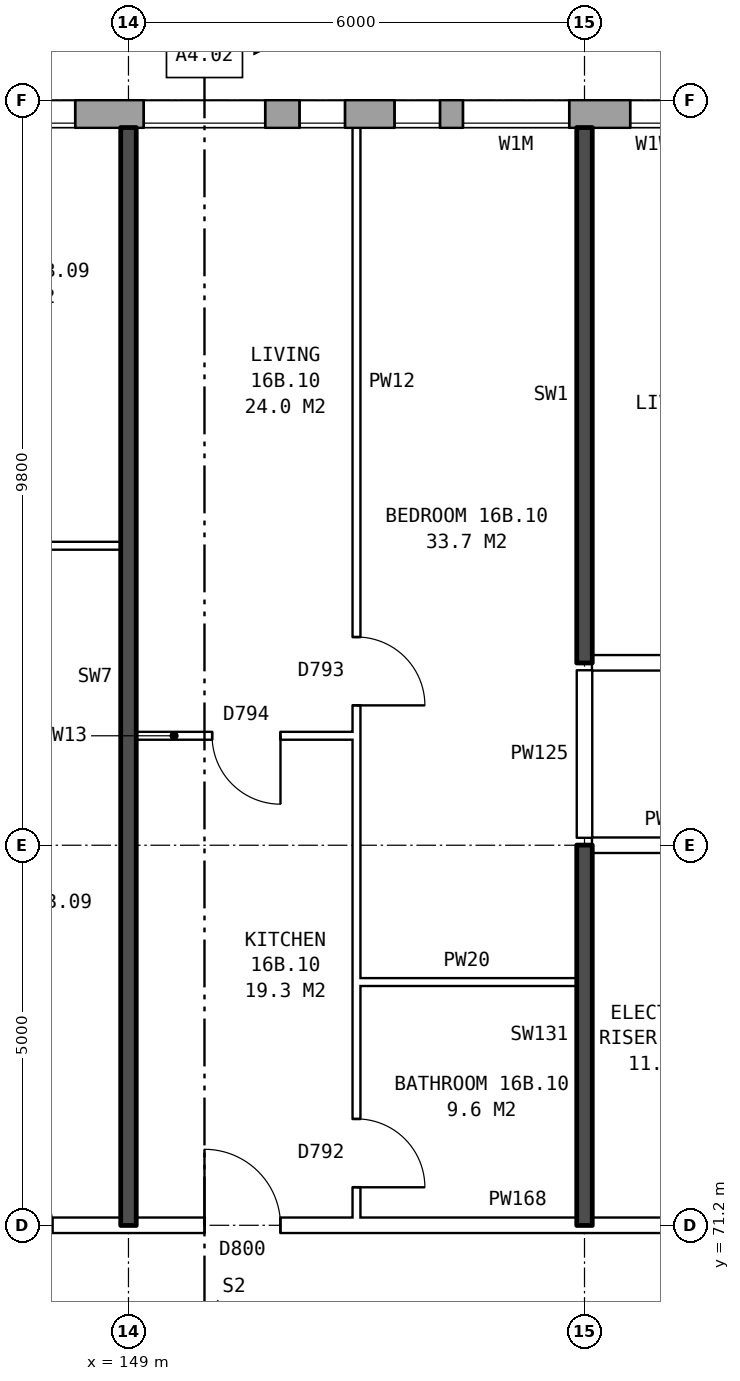
"""IFC4 building model, lengths in metres.
Left out: names, types, materials, properties, quantities, classifications, styles, units other than length and angle.
Written with IfcOpenShell. Run it as: python <this file> out.ifc"""

import sys

from ifc_helpers import new_model, si_unit, direction, frame, frame_2d, origin, place, context, subcontext, project, spatial, rectangle, extrude, element, fill, save


model = new_model("IFC4")
c1 = context("Model", 3, precision=1e-05, world=origin(), true_north=direction((0.0, 1.0)))
c2 = subcontext(c1, "Body", "Model", "MODEL_VIEW")
j1 = project(units=[si_unit("LENGTHUNIT", "METRE"), si_unit("PLANEANGLEUNIT", "RADIAN")], contexts=[c1])
p1 = place(None, origin())
s1 = spatial("IfcSite", under=j1, at=p1, CompositionType="ELEMENT")
p2 = place(p1, origin())
s2 = spatial("IfcBuilding", under=s1, at=p2, CompositionType="ELEMENT")
p3 = place(p2, frame((0.0, 0.0, 59.8)))
s3 = spatial("IfcBuildingStorey", under=s2, at=p3, CompositionType="ELEMENT", Elevation=59.8)
p4 = place(p3, frame((173.425, 85.82, 0.0), z_axis=(0.0, 0.0, 1.0), x_axis=(-1.0, 0.0, 0.0)))
e1 = element("IfcWall", 1, at=p4, inside=s3, PredefinedType="STANDARD", context=c2, shape_type="SweptSolid", body=[
    extrude(rectangle(XDim=39.351, YDim=0.36, at=frame_2d((19.675, 0.0))), origin(), (0.0, 0.0, 1.0), 2.85),
])
p5 = place(p4, frame((1.125, 0.0, 0.8)))
e2 = element("IfcOpeningElement", 2, at=p5, cuts=e1, PredefinedType="OPENING", context=c2, shape_type="SweptSolid", body=[
    extrude(rectangle(XDim=1.6, YDim=1.8, at=frame_2d((0.8, 0.9))), frame((0.0, 0.19, 0.0), z_axis=(0.0, -1.0, 0.0), x_axis=(1.0, 0.0, 0.0)), (0.0, 0.0, 1.0), 0.38),
])
p6 = place(p4, frame((4.125, 0.0, 0.8)))
e3 = element("IfcOpeningElement", 3, at=p6, cuts=e1, PredefinedType="OPENING", context=c2, shape_type="SweptSolid", body=[
    extrude(rectangle(XDim=1.6, YDim=1.8, at=frame_2d((0.8, 0.9))), frame((0.0, 0.19, 0.0), z_axis=(0.0, -1.0, 0.0), x_axis=(1.0, 0.0, 0.0)), (0.0, 0.0, 1.0), 0.38),
])
p7 = place(p4, frame((7.125, 0.0, 0.8)))
e4 = element("IfcOpeningElement", 4, at=p7, cuts=e1, PredefinedType="OPENING", context=c2, shape_type="SweptSolid", body=[
    extrude(rectangle(XDim=1.6, YDim=1.8, at=frame_2d((0.8, 0.9))), frame((0.0, 0.19, 0.0), z_axis=(0.0, -1.0, 0.0), x_axis=(1.0, 0.0, 0.0)), (0.0, 0.0, 1.0), 0.38),
])
p8 = place(p4, frame((10.125, 0.0, 0.8)))
e5 = element("IfcOpeningElement", 5, at=p8, cuts=e1, PredefinedType="OPENING", context=c2, shape_type="SweptSolid", body=[
    extrude(rectangle(XDim=1.6, YDim=1.8, at=frame_2d((0.8, 0.9))), frame((0.0, 0.19, 0.0), z_axis=(0.0, -1.0, 0.0), x_axis=(1.0, 0.0, 0.0)), (0.0, 0.0, 1.0), 0.38),
])
p9 = place(p4, frame((13.125, 0.0, 0.8)))
e6 = element("IfcOpeningElement", 6, at=p9, cuts=e1, PredefinedType="OPENING", context=c2, shape_type="SweptSolid", body=[
    extrude(rectangle(XDim=1.6, YDim=1.8, at=frame_2d((0.8, 0.9))), frame((0.0, 0.19, 0.0), z_axis=(0.0, -1.0, 0.0), x_axis=(1.0, 0.0, 0.0)), (0.0, 0.0, 1.0), 0.38),
])
p10 = place(p4, frame((15.025, 0.0, 0.8)))
e7 = element("IfcOpeningElement", 7, at=p10, cuts=e1, PredefinedType="OPENING", context=c2, shape_type="SweptSolid", body=[
    extrude(rectangle(XDim=1.0, YDim=1.8, at=frame_2d((0.5, 0.9))), frame((0.0, 0.19, 0.0), z_axis=(0.0, -1.0, 0.0), x_axis=(1.0, 0.0, 0.0)), (0.0, 0.0, 1.0), 0.38),
])
p11 = place(p4, frame((18.625, 0.0, 0.15)))
e8 = element("IfcOpeningElement", 8, at=p11, cuts=e1, PredefinedType="OPENING", context=c2, shape_type="SweptSolid", body=[
    extrude(rectangle(XDim=1.4, YDim=1.2, at=frame_2d((0.7, 0.6))), frame((0.0, 0.19, 0.0), z_axis=(0.0, -1.0, 0.0), x_axis=(1.0, 0.0, 0.0)), (0.0, 0.0, 1.0), 0.38),
])
p12 = place(p4, frame((21.575, 0.0, 1.7)))
e9 = element("IfcOpeningElement", 9, at=p12, cuts=e1, PredefinedType="OPENING", context=c2, shape_type="SweptSolid", body=[
    extrude(rectangle(XDim=0.6, YDim=0.9, at=frame_2d((0.3, 0.45))), frame((0.0, 0.19, 0.0), z_axis=(0.0, -1.0, 0.0), x_axis=(1.0, 0.0, 0.0)), (0.0, 0.0, 1.0), 0.38),
])
p13 = place(p4, frame((25.125, 0.0, 0.8)))
e10 = element("IfcOpeningElement", 10, at=p13, cuts=e1, PredefinedType="OPENING", context=c2, shape_type="SweptSolid", body=[
    extrude(rectangle(XDim=1.6, YDim=1.8, at=frame_2d((0.8, 0.9))), frame((0.0, 0.19, 0.0), z_axis=(0.0, -1.0, 0.0), x_axis=(1.0, 0.0, 0.0)), (0.0, 0.0, 1.0), 0.38),
])
p14 = place(p4, frame((28.125, 0.0, 0.8)))
e11 = element("IfcOpeningElement", 11, at=p14, cuts=e1, PredefinedType="OPENING", context=c2, shape_type="SweptSolid", body=[
    extrude(rectangle(XDim=1.6, YDim=1.8, at=frame_2d((0.8, 0.9))), frame((0.0, 0.19, 0.0), z_axis=(0.0, -1.0, 0.0), x_axis=(1.0, 0.0, 0.0)), (0.0, 0.0, 1.0), 0.38),
])
p15 = place(p4, frame((31.125, 0.0, 0.8)))
e12 = element("IfcOpeningElement", 12, at=p15, cuts=e1, PredefinedType="OPENING", context=c2, shape_type="SweptSolid", body=[
    extrude(rectangle(XDim=1.6, YDim=1.8, at=frame_2d((0.8, 0.9))), frame((0.0, 0.19, 0.0), z_axis=(0.0, -1.0, 0.0), x_axis=(1.0, 0.0, 0.0)), (0.0, 0.0, 1.0), 0.38),
])
p16 = place(p4, frame((34.125, 0.0, 0.8)))
e13 = element("IfcOpeningElement", 13, at=p16, cuts=e1, PredefinedType="OPENING", context=c2, shape_type="SweptSolid", body=[
    extrude(rectangle(XDim=1.6, YDim=1.8, at=frame_2d((0.8, 0.9))), frame((0.0, 0.19, 0.0), z_axis=(0.0, -1.0, 0.0), x_axis=(1.0, 0.0, 0.0)), (0.0, 0.0, 1.0), 0.38),
])
p17 = place(p4, frame((37.125, 0.0, 0.8)))
e14 = element("IfcOpeningElement", 14, at=p17, cuts=e1, PredefinedType="OPENING", context=c2, shape_type="SweptSolid", body=[
    extrude(rectangle(XDim=1.6, YDim=1.8, at=frame_2d((0.8, 0.9))), frame((0.0, 0.19, 0.0), z_axis=(0.0, -1.0, 0.0), x_axis=(1.0, 0.0, 0.0)), (0.0, 0.0, 1.0), 0.38),
])
p18 = place(p4, frame((16.325, 0.0, 1.0)))
e15 = element("IfcOpeningElement", 15, at=p18, cuts=e1, PredefinedType="OPENING", context=c2, shape_type="SweptSolid", body=[
    extrude(rectangle(XDim=0.6, YDim=1.5, at=frame_2d((0.3, 0.75))), frame((0.0, 0.19, 0.0), z_axis=(0.0, -1.0, 0.0), x_axis=(1.0, 0.0, 0.0)), (0.0, 0.0, 1.0), 0.38),
])
p19 = place(p4, frame((17.225, 0.0, 1.7)))
e16 = element("IfcOpeningElement", 16, at=p19, cuts=e1, PredefinedType="OPENING", context=c2, shape_type="SweptSolid", body=[
    extrude(rectangle(XDim=0.6, YDim=0.9, at=frame_2d((0.3, 0.45))), frame((0.0, 0.19, 0.0), z_axis=(0.0, -1.0, 0.0), x_axis=(1.0, 0.0, 0.0)), (0.0, 0.0, 1.0), 0.38),
])
p20 = place(p4, frame((20.325, 0.0, 0.25)))
e17 = element("IfcOpeningElement", 17, at=p20, cuts=e1, PredefinedType="OPENING", context=c2, shape_type="SweptSolid", body=[
    extrude(rectangle(XDim=0.6, YDim=0.9, at=frame_2d((0.3, 0.45))), frame((0.0, 0.19, 0.0), z_axis=(0.0, -1.0, 0.0), x_axis=(1.0, 0.0, 0.0)), (0.0, 0.0, 1.0), 0.38),
])
p21 = place(p4, frame((22.625, 0.0, 0.8)))
e18 = element("IfcOpeningElement", 18, at=p21, cuts=e1, PredefinedType="OPENING", context=c2, shape_type="SweptSolid", body=[
    extrude(rectangle(XDim=1.6, YDim=1.8, at=frame_2d((0.8, 0.9))), frame((0.0, 0.19, 0.0), z_axis=(0.0, -1.0, 0.0), x_axis=(1.0, 0.0, 0.0)), (0.0, 0.0, 1.0), 0.38),
])
p22 = place(p3, frame((142.76, 71.2, 0.0), z_axis=(0.0, 0.0, 1.0), x_axis=(1.0, 0.0, 0.0)))
e19 = element("IfcWall", 19, at=p22, inside=s3, PredefinedType="PARTITIONING", context=c2, shape_type="SweptSolid", body=[
    extrude(rectangle(XDim=14.48, YDim=0.2, at=frame_2d((7.24, 0.0))), origin(), (0.0, 0.0, 1.0), 2.85),
])
p23 = place(p22, frame((4.24, 0.0, 0.0)))
e20 = element("IfcOpeningElement", 20, at=p23, cuts=e19, PredefinedType="OPENING", context=c2, shape_type="SweptSolid", body=[
    extrude(rectangle(XDim=1.0, YDim=2.1, at=frame_2d((0.5, 1.05))), frame((0.0, 0.11, 0.0), z_axis=(0.0, -1.0, 0.0), x_axis=(1.0, 0.0, 0.0)), (0.0, 0.0, 1.0), 0.22),
])
p24 = place(p22, frame((7.24, 0.0, 0.0)))
e21 = element("IfcOpeningElement", 21, at=p24, cuts=e19, PredefinedType="OPENING", context=c2, shape_type="SweptSolid", body=[
    extrude(rectangle(XDim=1.0, YDim=2.1, at=frame_2d((0.5, 1.05))), frame((0.0, 0.11, 0.0), z_axis=(0.0, -1.0, 0.0), x_axis=(1.0, 0.0, 0.0)), (0.0, 0.0, 1.0), 0.22),
])
p25 = place(p3, frame((152.0, 74.4, 0.0), z_axis=(0.0, 0.0, 1.0), x_axis=(1.0, 0.0, 0.0)))
e22 = element("IfcWall", 22, at=p25, inside=s3, PredefinedType="PARTITIONING", context=c2, shape_type="SweptSolid", body=[
    extrude(rectangle(XDim=2.9, YDim=0.1, at=frame_2d((1.45, 0.0))), origin(), (0.0, 0.0, 1.0), 2.85),
])
p26 = place(p3, frame((155.1, 76.2, 0.0), z_axis=(0.0, 0.0, 1.0), x_axis=(1.0, 0.0, 0.0)))
e23 = element("IfcWall", 23, at=p26, inside=s3, PredefinedType="PARTITIONING", context=c2, shape_type="SweptSolid", body=[
    extrude(rectangle(XDim=2.14, YDim=0.2, at=frame_2d((1.07, 0.0))), origin(), (0.0, 0.0, 1.0), 2.85),
])
p27 = place(p3, frame((149.1, 77.64, 0.0), z_axis=(0.0, 0.0, 1.0), x_axis=(1.0, 0.0, 0.0)))
e24 = element("IfcWall", 24, at=p27, inside=s3, PredefinedType="PARTITIONING", context=c2, shape_type="SweptSolid", body=[
    extrude(rectangle(XDim=2.9, YDim=0.1, at=frame_2d((1.45, 0.0))), origin(), (0.0, 0.0, 1.0), 2.85),
])
p28 = place(p27, frame((1.0, 0.0, 0.0)))
e25 = element("IfcOpeningElement", 25, at=p28, cuts=e24, PredefinedType="OPENING", context=c2, shape_type="SweptSolid", body=[
    extrude(rectangle(XDim=0.9, YDim=2.1, at=frame_2d((0.45, 1.05))), frame((0.0, 0.06, 0.0), z_axis=(0.0, -1.0, 0.0), x_axis=(1.0, 0.0, 0.0)), (0.0, 0.0, 1.0), 0.12),
])
p29 = place(p3, frame((155.1, 78.6, 0.0), z_axis=(0.0, 0.0, 1.0), x_axis=(1.0, 0.0, 0.0)))
e26 = element("IfcWall", 26, at=p29, inside=s3, PredefinedType="PARTITIONING", context=c2, shape_type="SweptSolid", body=[
    extrude(rectangle(XDim=21.04, YDim=0.2, at=frame_2d((10.52, 0.0))), origin(), (0.0, 0.0, 1.0), 2.85),
])
p30 = place(p29, frame((2.45, 0.0, 0.0)))
e27 = element("IfcOpeningElement", 27, at=p30, cuts=e26, PredefinedType="OPENING", context=c2, shape_type="SweptSolid", body=[
    extrude(rectangle(XDim=1.0, YDim=2.1, at=frame_2d((0.5, 1.05))), frame((0.0, 0.11, 0.0), z_axis=(0.0, -1.0, 0.0), x_axis=(1.0, 0.0, 0.0)), (0.0, 0.0, 1.0), 0.22),
])
p31 = place(p29, frame((14.4, 0.0, 0.0)))
e28 = element("IfcOpeningElement", 28, at=p31, cuts=e26, PredefinedType="OPENING", context=c2, shape_type="SweptSolid", body=[
    extrude(rectangle(XDim=1.0, YDim=2.1, at=frame_2d((0.5, 1.05))), frame((0.0, 0.11, 0.0), z_axis=(0.0, -1.0, 0.0), x_axis=(1.0, 0.0, 0.0)), (0.0, 0.0, 1.0), 0.22),
])
p32 = place(p3, frame((146.0, 80.14, 0.0), z_axis=(0.0, 0.0, 1.0), x_axis=(1.0, 0.0, 0.0)))
e29 = element("IfcWall", 29, at=p32, inside=s3, PredefinedType="PARTITIONING", context=c2, shape_type="SweptSolid", body=[
    extrude(rectangle(XDim=2.9, YDim=0.1, at=frame_2d((1.45, 0.0))), origin(), (0.0, 0.0, 1.0), 2.85),
])
p33 = place(p32, frame((1.0, 0.0, 0.0)))
e30 = element("IfcOpeningElement", 30, at=p33, cuts=e29, PredefinedType="OPENING", context=c2, shape_type="SweptSolid", body=[
    extrude(rectangle(XDim=0.9, YDim=2.1, at=frame_2d((0.45, 1.05))), frame((0.0, 0.06, 0.0), z_axis=(0.0, -1.0, 0.0), x_axis=(1.0, 0.0, 0.0)), (0.0, 0.0, 1.0), 0.12),
])
p34 = place(p3, frame((149.0, 71.2, 0.0), z_axis=(0.0, 0.0, 1.0), x_axis=(0.0, 1.0, 0.0)))
e31 = element("IfcWall", 31, at=p34, inside=s3, PredefinedType="SOLIDWALL", context=c2, shape_type="SweptSolid", body=[
    extrude(rectangle(XDim=14.44, YDim=0.2, at=frame_2d((7.22, 0.0))), origin(), (0.0, 0.0, 1.0), 2.85),
])
p35 = place(p3, frame((152.0, 71.3, 0.0), z_axis=(0.0, 0.0, 1.0), x_axis=(0.0, 1.0, 0.0)))
e32 = element("IfcWall", 32, at=p35, inside=s3, PredefinedType="PARTITIONING", context=c2, shape_type="SweptSolid", body=[
    extrude(rectangle(XDim=14.34, YDim=0.1, at=frame_2d((7.17, 0.0))), origin(), (0.0, 0.0, 1.0), 2.85),
])
p36 = place(p35, frame((6.74, 0.0, 0.0)))
e33 = element("IfcOpeningElement", 33, at=p36, cuts=e32, PredefinedType="OPENING", context=c2, shape_type="SweptSolid", body=[
    extrude(rectangle(XDim=0.9, YDim=2.1, at=frame_2d((0.45, 1.05))), frame((0.0, 0.06, 0.0), z_axis=(0.0, -1.0, 0.0), x_axis=(1.0, 0.0, 0.0)), (0.0, 0.0, 1.0), 0.12),
])
p37 = place(p35, frame((0.4, 0.0, 0.0)))
e34 = element("IfcOpeningElement", 34, at=p37, cuts=e32, PredefinedType="OPENING", context=c2, shape_type="SweptSolid", body=[
    extrude(rectangle(XDim=0.9, YDim=2.1, at=frame_2d((0.45, 1.05))), frame((0.0, 0.06, 0.0), z_axis=(0.0, -1.0, 0.0), x_axis=(1.0, 0.0, 0.0)), (0.0, 0.0, 1.0), 0.12),
])
p38 = place(p3, frame((155.0, 71.2, 0.0), z_axis=(0.0, 0.0, 1.0), x_axis=(0.0, 1.0, 0.0)))
e35 = element("IfcWall", 35, at=p38, inside=s3, PredefinedType="SOLIDWALL", context=c2, shape_type="SweptSolid", body=[
    extrude(rectangle(XDim=5.0, YDim=0.2, at=frame_2d((2.5, 0.0))), origin(), (0.0, 0.0, 1.0), 2.85),
])
p39 = place(p3, frame((155.0, 76.3, 0.0), z_axis=(0.0, 0.0, 1.0), x_axis=(0.0, 1.0, 0.0)))
e36 = element("IfcWall", 36, at=p39, inside=s3, PredefinedType="PARTITIONING", context=c2, shape_type="SweptSolid", body=[
    extrude(rectangle(XDim=2.2, YDim=0.2, at=frame_2d((1.1, 0.0))), origin(), (0.0, 0.0, 1.0), 2.85),
])
p40 = place(p3, frame((155.0, 78.6, 0.0), z_axis=(0.0, 0.0, 1.0), x_axis=(0.0, 1.0, 0.0)))
e37 = element("IfcWall", 37, at=p40, inside=s3, PredefinedType="SOLIDWALL", context=c2, shape_type="SweptSolid", body=[
    extrude(rectangle(XDim=7.04, YDim=0.2, at=frame_2d((3.52, 0.0))), origin(), (0.0, 0.0, 1.0), 2.85),
])
p41 = place(p11, origin())
e38 = element("IfcWindow", 38, at=p41, inside=s3, PartitioningType="SINGLE_PANEL", PredefinedType="WINDOW", context=c2, shape_type="SweptSolid", body=[
    extrude(rectangle(XDim=1.4, YDim=1.2, at=frame_2d((0.7, 0.6))), frame((0.0, 0.15, 0.0), z_axis=(0.0, -1.0, 0.0), x_axis=(1.0, 0.0, 0.0)), (0.0, 0.0, 1.0), 0.06),
])
fill(e8, e38)
p42 = place(p12, origin())
e39 = element("IfcWindow", 39, at=p42, inside=s3, PartitioningType="SINGLE_PANEL", PredefinedType="WINDOW", context=c2, shape_type="SweptSolid", body=[
    extrude(rectangle(XDim=0.6, YDim=0.9, at=frame_2d((0.3, 0.45))), frame((0.0, 0.15, 0.0), z_axis=(0.0, -1.0, 0.0), x_axis=(1.0, 0.0, 0.0)), (0.0, 0.0, 1.0), 0.06),
])
fill(e9, e39)
p43 = place(p13, origin())
e40 = element("IfcWindow", 40, at=p43, inside=s3, PartitioningType="SINGLE_PANEL", PredefinedType="WINDOW", context=c2, shape_type="SweptSolid", body=[
    extrude(rectangle(XDim=1.6, YDim=1.8, at=frame_2d((0.8, 0.9))), frame((0.0, 0.15, 0.0), z_axis=(0.0, -1.0, 0.0), x_axis=(1.0, 0.0, 0.0)), (0.0, 0.0, 1.0), 0.06),
])
fill(e10, e40)
p44 = place(p36, frame((0.9, 0.0, 0.0), z_axis=(0.0, 0.0, 1.0), x_axis=(-1.0, 0.0, 0.0)))
e41 = element("IfcDoor", 41, at=p44, inside=s3, OperationType="SINGLE_SWING_RIGHT", PredefinedType="DOOR", context=c2, shape_type="SweptSolid", body=[
    extrude(rectangle(XDim=0.9, YDim=2.1, at=frame_2d((0.45, 1.05))), frame((0.0, 0.025, 0.0), z_axis=(0.0, -1.0, 0.0), x_axis=(1.0, 0.0, 0.0)), (0.0, 0.0, 1.0), 0.05),
])
fill(e33, e41)
p45 = place(p24, origin())
e42 = element("IfcDoor", 42, at=p45, inside=s3, OperationType="SINGLE_SWING_LEFT", PredefinedType="DOOR", context=c2, shape_type="SweptSolid", body=[
    extrude(rectangle(XDim=1.0, YDim=2.1, at=frame_2d((0.5, 1.05))), frame((0.0, 0.025, 0.0), z_axis=(0.0, -1.0, 0.0), x_axis=(1.0, 0.0, 0.0)), (0.0, 0.0, 1.0), 0.05),
])
fill(e21, e42)
p46 = place(p28, frame((0.9, 0.0, 0.0), z_axis=(0.0, 0.0, 1.0), x_axis=(-1.0, 0.0, 0.0)))
e43 = element("IfcDoor", 43, at=p46, inside=s3, OperationType="SINGLE_SWING_LEFT", PredefinedType="DOOR", context=c2, shape_type="SweptSolid", body=[
    extrude(rectangle(XDim=0.9, YDim=2.1, at=frame_2d((0.45, 1.05))), frame((0.0, 0.025, 0.0), z_axis=(0.0, -1.0, 0.0), x_axis=(1.0, 0.0, 0.0)), (0.0, 0.0, 1.0), 0.05),
])
fill(e25, e43)
p47 = place(p37, frame((0.9, 0.0, 0.0), z_axis=(0.0, 0.0, 1.0), x_axis=(-1.0, 0.0, 0.0)))
e44 = element("IfcDoor", 44, at=p47, inside=s3, OperationType="SINGLE_SWING_RIGHT", PredefinedType="DOOR", context=c2, shape_type="SweptSolid", body=[
    extrude(rectangle(XDim=0.9, YDim=2.1, at=frame_2d((0.45, 1.05))), frame((0.0, 0.025, 0.0), z_axis=(0.0, -1.0, 0.0), x_axis=(1.0, 0.0, 0.0)), (0.0, 0.0, 1.0), 0.05),
])
fill(e34, e44)
p48 = place(p19, origin())
e45 = element("IfcWindow", 45, at=p48, inside=s3, PartitioningType="SINGLE_PANEL", PredefinedType="WINDOW", context=c2, shape_type="SweptSolid", body=[
    extrude(rectangle(XDim=0.6, YDim=0.9, at=frame_2d((0.3, 0.45))), frame((0.0, 0.15, 0.0), z_axis=(0.0, -1.0, 0.0), x_axis=(1.0, 0.0, 0.0)), (0.0, 0.0, 1.0), 0.06),
])
fill(e16, e45)
p49 = place(p20, origin())
e46 = element("IfcWindow", 46, at=p49, inside=s3, PartitioningType="SINGLE_PANEL", PredefinedType="WINDOW", context=c2, shape_type="SweptSolid", body=[
    extrude(rectangle(XDim=0.6, YDim=0.9, at=frame_2d((0.3, 0.45))), frame((0.0, 0.15, 0.0), z_axis=(0.0, -1.0, 0.0), x_axis=(1.0, 0.0, 0.0)), (0.0, 0.0, 1.0), 0.06),
])
fill(e17, e46)
p50 = place(p21, origin())
e47 = element("IfcWindow", 47, at=p50, inside=s3, PartitioningType="SINGLE_PANEL", PredefinedType="WINDOW", context=c2, shape_type="SweptSolid", body=[
    extrude(rectangle(XDim=1.6, YDim=1.8, at=frame_2d((0.8, 0.9))), frame((0.0, 0.15, 0.0), z_axis=(0.0, -1.0, 0.0), x_axis=(1.0, 0.0, 0.0)), (0.0, 0.0, 1.0), 0.06),
])
fill(e18, e47)
save(model, sys.argv[1])
